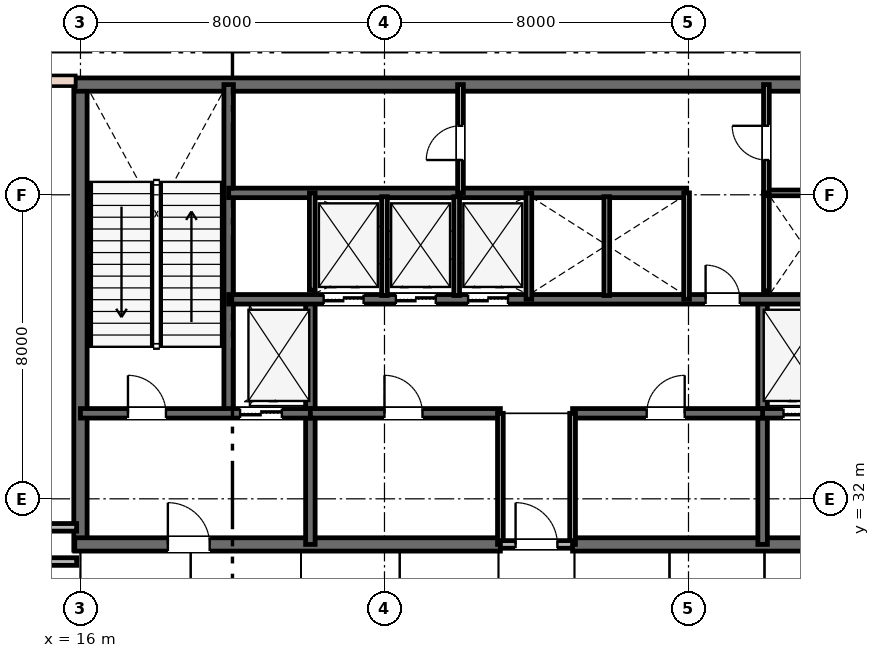
"""IFC4 building model, lengths in metres.
Left out: names, types, materials, properties, quantities, classifications, styles, units other than length and angle.
Written with IfcOpenShell. Run it as: python <this file> out.ifc"""

import sys

from ifc_helpers import new_model, si_unit, direction, frame, frame_2d, origin, place, context, subcontext, project, spatial, rectangle, extrude, element, fill, save


model = new_model("IFC4")
c1 = context("Model", 3, precision=1e-05, world=origin(), true_north=direction((0.0, 1.0)))
c2 = subcontext(c1, "Body", "Model", "MODEL_VIEW")
j1 = project(units=[si_unit("LENGTHUNIT", "METRE"), si_unit("PLANEANGLEUNIT", "RADIAN")], contexts=[c1])
p1 = place(None, origin())
s1 = spatial("IfcSite", under=j1, at=p1, CompositionType="ELEMENT")
p2 = place(p1, origin())
s2 = spatial("IfcBuilding", under=s1, at=p2, CompositionType="ELEMENT")
p3 = place(p2, frame((0.0, 0.0, 208.2)))
s3 = spatial("IfcBuildingStorey", under=s2, at=p3, CompositionType="ELEMENT", Elevation=208.2)
p4 = place(p3, frame((16.0, 30.65, 0.0), z_axis=(0.0, 0.0, 1.0), x_axis=(0.0, 1.0, 0.0)))
e1 = element("IfcWall", 1, at=p4, inside=s3, PredefinedType="SHEAR", context=c2, shape_type="SweptSolid", body=[
    extrude(rectangle(XDim=12.3, YDim=0.35, at=frame_2d((6.15, 0.0))), origin(), (0.0, 0.0, 1.0), 4.8),
])
p5 = place(p3, frame((15.85, 42.9, 0.0), z_axis=(0.0, 0.0, 1.0), x_axis=(1.0, 0.0, 0.0)))
e2 = element("IfcWall", 2, at=p5, inside=s3, PredefinedType="SHEAR", context=c2, shape_type="SweptSolid", body=[
    extrude(rectangle(XDim=24.3, YDim=0.35, at=frame_2d((12.15, 0.0))), origin(), (0.0, 0.0, 1.0), 4.8),
])
p6 = place(p3, frame((15.85, 30.8, 0.0), z_axis=(0.0, 0.0, 1.0), x_axis=(1.0, 0.0, 0.0)))
e3 = element("IfcWall", 3, at=p6, inside=s3, PredefinedType="SHEAR", context=c2, shape_type="SweptSolid", body=[
    extrude(rectangle(XDim=11.2, YDim=0.35, at=frame_2d((5.6, 0.0))), origin(), (0.0, 0.0, 1.0), 4.8),
])
p7 = place(p6, frame((2.45, 0.0, 0.0)))
e4 = element("IfcOpeningElement", 4, at=p7, cuts=e3, PredefinedType="OPENING", context=c2, shape_type="SweptSolid", body=[
    extrude(rectangle(XDim=1.1, YDim=2.15, at=frame_2d((0.55, 1.075))), frame((0.0, 0.185, 0.0), z_axis=(0.0, -1.0, 0.0), x_axis=(1.0, 0.0, 0.0)), (0.0, 0.0, 1.0), 0.37),
])
p8 = place(p3, frame((28.95, 30.8, 0.0), z_axis=(0.0, 0.0, 1.0), x_axis=(1.0, 0.0, 0.0)))
e5 = element("IfcWall", 5, at=p8, inside=s3, PredefinedType="SHEAR", context=c2, shape_type="SweptSolid", body=[
    extrude(rectangle(XDim=11.2, YDim=0.35, at=frame_2d((5.6, 0.0))), origin(), (0.0, 0.0, 1.0), 4.8),
])
p9 = place(p8, frame((7.65, 0.0, 0.0)))
e6 = element("IfcOpeningElement", 6, at=p9, cuts=e5, PredefinedType="OPENING", context=c2, shape_type="SweptSolid", body=[
    extrude(rectangle(XDim=1.1, YDim=2.15, at=frame_2d((0.55, 1.075))), frame((0.0, 0.185, 0.0), z_axis=(0.0, -1.0, 0.0), x_axis=(1.0, 0.0, 0.0)), (0.0, 0.0, 1.0), 0.37),
])
p10 = place(p3, frame((19.9, 34.25, 0.0), z_axis=(0.0, 0.0, 1.0), x_axis=(0.0, 1.0, 0.0)))
e7 = element("IfcWall", 7, at=p10, inside=s3, PredefinedType="SHEAR", context=c2, shape_type="SweptSolid", body=[
    extrude(rectangle(XDim=8.65, YDim=0.25, at=frame_2d((4.325, 0.0))), origin(), (0.0, 0.0, 1.0), 4.8),
])
for number, where, z_axis, x_axis in (
    (8, (22.05, 30.8, 0.0), (0.0, 0.0, 1.0), (0.0, 1.0, 0.0)),
    (9, (33.95, 30.8, 0.0), (0.0, 0.0, 1.0), (0.0, 1.0, 0.0)),
):
    element("IfcWall", number, at=place(p3, frame(where, z_axis=z_axis, x_axis=x_axis)), inside=s3, PredefinedType="SHEAR", context=c2, shape_type="SweptSolid", body=[
        extrude(rectangle(XDim=6.45, YDim=0.25, at=frame_2d((3.225, 0.0))), origin(), (0.0, 0.0, 1.0), 4.8),
    ])
p11 = place(p3, frame((16.0, 34.25, 0.0), z_axis=(0.0, 0.0, 1.0), x_axis=(1.0, 0.0, 0.0)))
e10 = element("IfcWall", 10, at=p11, inside=s3, PredefinedType="SHEAR", context=c2, shape_type="SweptSolid", body=[
    extrude(rectangle(XDim=6.05, YDim=0.25, at=frame_2d((3.025, 0.0))), origin(), (0.0, 0.0, 1.0), 4.8),
])
p12 = place(p11, frame((1.25, 0.0, 0.0)))
e11 = element("IfcOpeningElement", 11, at=p12, cuts=e10, PredefinedType="OPENING", context=c2, shape_type="SweptSolid", body=[
    extrude(rectangle(XDim=1.0, YDim=2.15, at=frame_2d((0.5, 1.075))), frame((0.0, 0.135, 0.0), z_axis=(0.0, -1.0, 0.0), x_axis=(1.0, 0.0, 0.0)), (0.0, 0.0, 1.0), 0.27),
])
p13 = place(p11, frame((4.2, 0.0, 0.0)))
e12 = element("IfcOpeningElement", 12, at=p13, cuts=e10, PredefinedType="OPENING", context=c2, shape_type="SweptSolid", body=[
    extrude(rectangle(XDim=1.1, YDim=2.15, at=frame_2d((0.55, 1.075))), frame((0.0, 0.135, 0.0), z_axis=(0.0, -1.0, 0.0), x_axis=(1.0, 0.0, 0.0)), (0.0, 0.0, 1.0), 0.27),
])
p14 = place(p3, frame((33.95, 34.25, 0.0), z_axis=(0.0, 0.0, 1.0), x_axis=(1.0, 0.0, 0.0)))
e13 = element("IfcWall", 13, at=p14, inside=s3, PredefinedType="SHEAR", context=c2, shape_type="SweptSolid", body=[
    extrude(rectangle(XDim=6.05, YDim=0.25, at=frame_2d((3.025, 0.0))), origin(), (0.0, 0.0, 1.0), 4.8),
])
p15 = place(p14, frame((3.7, 0.0, 0.0)))
e14 = element("IfcOpeningElement", 14, at=p15, cuts=e13, PredefinedType="OPENING", context=c2, shape_type="SweptSolid", body=[
    extrude(rectangle(XDim=1.0, YDim=2.15, at=frame_2d((0.5, 1.075))), frame((0.0, 0.135, 0.0), z_axis=(0.0, -1.0, 0.0), x_axis=(1.0, 0.0, 0.0)), (0.0, 0.0, 1.0), 0.27),
])
p16 = place(p14, frame((0.55, 0.0, 0.0)))
e15 = element("IfcOpeningElement", 15, at=p16, cuts=e13, PredefinedType="OPENING", context=c2, shape_type="SweptSolid", body=[
    extrude(rectangle(XDim=1.1, YDim=2.15, at=frame_2d((0.55, 1.075))), frame((0.0, 0.135, 0.0), z_axis=(0.0, -1.0, 0.0), x_axis=(1.0, 0.0, 0.0)), (0.0, 0.0, 1.0), 0.27),
])
p17 = place(p3, frame((22.05, 34.25, 0.0), z_axis=(0.0, 0.0, 1.0), x_axis=(1.0, 0.0, 0.0)))
e16 = element("IfcWall", 16, at=p17, inside=s3, PredefinedType="SHEAR", context=c2, shape_type="SweptSolid", body=[
    extrude(rectangle(XDim=5.0, YDim=0.25, at=frame_2d((2.5, 0.0))), origin(), (0.0, 0.0, 1.0), 4.8),
])
p18 = place(p17, frame((1.95, 0.0, 0.0)))
e17 = element("IfcOpeningElement", 17, at=p18, cuts=e16, PredefinedType="OPENING", context=c2, shape_type="SweptSolid", body=[
    extrude(rectangle(XDim=1.0, YDim=2.15, at=frame_2d((0.5, 1.075))), frame((0.0, 0.135, 0.0), z_axis=(0.0, -1.0, 0.0), x_axis=(1.0, 0.0, 0.0)), (0.0, 0.0, 1.0), 0.27),
])
p19 = place(p3, frame((28.95, 34.25, 0.0), z_axis=(0.0, 0.0, 1.0), x_axis=(1.0, 0.0, 0.0)))
e18 = element("IfcWall", 18, at=p19, inside=s3, PredefinedType="SHEAR", context=c2, shape_type="SweptSolid", body=[
    extrude(rectangle(XDim=5.0, YDim=0.25, at=frame_2d((2.5, 0.0))), origin(), (0.0, 0.0, 1.0), 4.8),
])
p20 = place(p19, frame((1.95, 0.0, 0.0)))
e19 = element("IfcOpeningElement", 19, at=p20, cuts=e18, PredefinedType="OPENING", context=c2, shape_type="SweptSolid", body=[
    extrude(rectangle(XDim=1.0, YDim=2.15, at=frame_2d((0.5, 1.075))), frame((0.0, 0.135, 0.0), z_axis=(0.0, -1.0, 0.0), x_axis=(1.0, 0.0, 0.0)), (0.0, 0.0, 1.0), 0.27),
])
p21 = place(p3, frame((19.9, 37.25, 0.0), z_axis=(0.0, 0.0, 1.0), x_axis=(1.0, 0.0, 0.0)))
e20 = element("IfcWall", 20, at=p21, inside=s3, PredefinedType="SHEAR", context=c2, shape_type="SweptSolid", body=[
    extrude(rectangle(XDim=16.2, YDim=0.25, at=frame_2d((8.1, 0.0))), origin(), (0.0, 0.0, 1.0), 4.8),
])
p22 = place(p21, frame((12.55, 0.0, 0.0)))
e21 = element("IfcOpeningElement", 21, at=p22, cuts=e20, PredefinedType="OPENING", context=c2, shape_type="SweptSolid", body=[
    extrude(rectangle(XDim=0.9, YDim=2.15, at=frame_2d((0.45, 1.075))), frame((0.0, 0.135, 0.0), z_axis=(0.0, -1.0, 0.0), x_axis=(1.0, 0.0, 0.0)), (0.0, 0.0, 1.0), 0.27),
])
p23 = place(p21, frame((2.5, 0.0, 0.0)))
e22 = element("IfcOpeningElement", 22, at=p23, cuts=e20, PredefinedType="OPENING", context=c2, shape_type="SweptSolid", body=[
    extrude(rectangle(XDim=1.05, YDim=2.15, at=frame_2d((0.525, 1.075))), frame((0.0, 0.135, 0.0), z_axis=(0.0, -1.0, 0.0), x_axis=(1.0, 0.0, 0.0)), (0.0, 0.0, 1.0), 0.27),
])
p24 = place(p21, frame((4.4, 0.0, 0.0)))
e23 = element("IfcOpeningElement", 23, at=p24, cuts=e20, PredefinedType="OPENING", context=c2, shape_type="SweptSolid", body=[
    extrude(rectangle(XDim=1.05, YDim=2.15, at=frame_2d((0.525, 1.075))), frame((0.0, 0.135, 0.0), z_axis=(0.0, -1.0, 0.0), x_axis=(1.0, 0.0, 0.0)), (0.0, 0.0, 1.0), 0.27),
])
p25 = place(p21, frame((6.3, 0.0, 0.0)))
e24 = element("IfcOpeningElement", 24, at=p25, cuts=e20, PredefinedType="OPENING", context=c2, shape_type="SweptSolid", body=[
    extrude(rectangle(XDim=1.05, YDim=2.15, at=frame_2d((0.525, 1.075))), frame((0.0, 0.135, 0.0), z_axis=(0.0, -1.0, 0.0), x_axis=(1.0, 0.0, 0.0)), (0.0, 0.0, 1.0), 0.27),
])
p26 = place(p3, frame((19.9, 40.05, 0.0), z_axis=(0.0, 0.0, 1.0), x_axis=(1.0, 0.0, 0.0)))
e25 = element("IfcWall", 25, at=p26, inside=s3, PredefinedType="SHEAR", context=c2, shape_type="SweptSolid", body=[
    extrude(rectangle(XDim=12.05, YDim=0.25, at=frame_2d((6.025, 0.0))), origin(), (0.0, 0.0, 1.0), 4.8),
])
p27 = place(p3, frame((15.86, 43.0, 0.0), z_axis=(0.0, 0.0, 1.0), x_axis=(-1.0, 0.0, 0.0)))
e26 = element("IfcWall", 26, at=p27, inside=s3, PredefinedType="STANDARD", context=c2, shape_type="SweptSolid", body=[
    extrude(rectangle(XDim=7.36, YDim=0.25, at=frame_2d((3.68, 0.0))), origin(), (0.0, 0.0, 1.0), 1.15),
])
for number, where, z_axis, x_axis in (
    (27, (27.05, 30.8, 0.0), (0.0, 0.0, 1.0), (0.0, 1.0, 0.0)),
    (28, (28.95, 30.8, 0.0), (0.0, 0.0, 1.0), (0.0, 1.0, 0.0)),
):
    element("IfcWall", number, at=place(p3, frame(where, z_axis=z_axis, x_axis=x_axis)), inside=s3, PredefinedType="PLUMBINGWALL", context=c2, shape_type="SweptSolid", body=[
        extrude(rectangle(XDim=3.45, YDim=0.15, at=frame_2d((1.725, 0.0))), origin(), (0.0, 0.0, 1.0), 4.02),
    ])
p28 = place(p3, frame((27.05, 30.8, 0.0), z_axis=(0.0, 0.0, 1.0), x_axis=(1.0, 0.0, 0.0)))
e29 = element("IfcWall", 29, at=p28, inside=s3, PredefinedType="PARTITIONING", context=c2, shape_type="SweptSolid", body=[
    extrude(rectangle(XDim=1.9, YDim=0.2, at=frame_2d((0.95, 0.0))), origin(), (0.0, 0.0, 1.0), 4.02),
])
p29 = place(p28, frame((0.4, 0.0, 0.0)))
e30 = element("IfcOpeningElement", 30, at=p29, cuts=e29, PredefinedType="OPENING", context=c2, shape_type="SweptSolid", body=[
    extrude(rectangle(XDim=1.1, YDim=2.15, at=frame_2d((0.55, 1.075))), frame((0.0, 0.11, 0.0), z_axis=(0.0, -1.0, 0.0), x_axis=(1.0, 0.0, 0.0)), (0.0, 0.0, 1.0), 0.22),
])
p30 = place(p3, frame((22.1, 37.49, 0.0), z_axis=(0.0, 0.0, 1.0), x_axis=(0.0, 1.0, 0.0)))
e31 = element("IfcWall", 31, at=p30, inside=s3, PredefinedType="PLUMBINGWALL", context=c2, shape_type="SweptSolid", body=[
    extrude(rectangle(XDim=2.56, YDim=0.15, at=frame_2d((1.28, 0.0))), origin(), (0.0, 0.0, 1.0), 4.02),
])
p31 = place(p3, frame((27.8, 37.25, 0.0), z_axis=(0.0, 0.0, 1.0), x_axis=(0.0, 1.0, 0.0)))
e32 = element("IfcWall", 32, at=p31, inside=s3, PredefinedType="PLUMBINGWALL", context=c2, shape_type="SweptSolid", body=[
    extrude(rectangle(XDim=2.8, YDim=0.15, at=frame_2d((1.4, 0.0))), origin(), (0.0, 0.0, 1.0), 4.02),
])
for number, where, z_axis, x_axis in (
    (33, (24.0, 37.35, 0.0), (0.0, 0.0, 1.0), (0.0, 1.0, 0.0)),
    (34, (25.9, 37.35, 0.0), (0.0, 0.0, 1.0), (0.0, 1.0, 0.0)),
):
    element("IfcWall", number, at=place(p3, frame(where, z_axis=z_axis, x_axis=x_axis)), inside=s3, PredefinedType="PLUMBINGWALL", context=c2, shape_type="SweptSolid", body=[
        extrude(rectangle(XDim=2.6, YDim=0.15, at=frame_2d((1.3, 0.0))), origin(), (0.0, 0.0, 1.0), 4.02),
    ])
p32 = place(p3, frame((31.95, 37.25, 0.0), z_axis=(0.0, 0.0, 1.0), x_axis=(0.0, 1.0, 0.0)))
e35 = element("IfcWall", 35, at=p32, inside=s3, PredefinedType="PLUMBINGWALL", context=c2, shape_type="SweptSolid", body=[
    extrude(rectangle(XDim=2.8, YDim=0.15, at=frame_2d((1.4, 0.0))), origin(), (0.0, 0.0, 1.0), 4.02),
])
p33 = place(p3, frame((29.85, 37.35, 0.0), z_axis=(0.0, 0.0, 1.0), x_axis=(0.0, 1.0, 0.0)))
e36 = element("IfcWall", 36, at=p33, inside=s3, PredefinedType="PLUMBINGWALL", context=c2, shape_type="SweptSolid", body=[
    extrude(rectangle(XDim=2.6, YDim=0.15, at=frame_2d((1.3, 0.0))), origin(), (0.0, 0.0, 1.0), 4.02),
])
p34 = place(p3, frame((34.05, 37.473, 0.0), z_axis=(0.0, 0.0, 1.0), x_axis=(0.0, 1.0, 0.0)))
e37 = element("IfcWall", 37, at=p34, inside=s3, PredefinedType="PLUMBINGWALL", context=c2, shape_type="SweptSolid", body=[
    extrude(rectangle(XDim=2.577, YDim=0.15, at=frame_2d((1.288, 0.0))), origin(), (0.0, 0.0, 1.0), 4.02),
])
p35 = place(p3, frame((34.05, 40.05, 0.0), z_axis=(0.0, 0.0, 1.0), x_axis=(1.0, 0.0, 0.0)))
e38 = element("IfcWall", 38, at=p35, inside=s3, PredefinedType="PARTITIONING", context=c2, shape_type="SweptSolid", body=[
    extrude(rectangle(XDim=2.05, YDim=0.15, at=frame_2d((1.025, 0.0))), origin(), (0.0, 0.0, 1.0), 4.02),
])
p36 = place(p3, frame((34.05, 40.05, 0.0), z_axis=(0.0, 0.0, 1.0), x_axis=(0.0, 1.0, 0.0)))
e39 = element("IfcWall", 39, at=p36, inside=s3, PredefinedType="PARTITIONING", context=c2, shape_type="SweptSolid", body=[
    extrude(rectangle(XDim=2.85, YDim=0.15, at=frame_2d((1.425, 0.0))), origin(), (0.0, 0.0, 1.0), 4.02),
])
p37 = place(p36, frame((0.865, 0.0, 0.0)))
e40 = element("IfcOpeningElement", 40, at=p37, cuts=e39, PredefinedType="OPENING", context=c2, shape_type="SweptSolid", body=[
    extrude(rectangle(XDim=0.9, YDim=2.15, at=frame_2d((0.45, 1.075))), frame((0.0, 0.085, 0.0), z_axis=(0.0, -1.0, 0.0), x_axis=(1.0, 0.0, 0.0)), (0.0, 0.0, 1.0), 0.17),
])
p38 = place(p3, frame((26.0, 40.05, 0.0), z_axis=(0.0, 0.0, 1.0), x_axis=(0.0, 1.0, 0.0)))
e41 = element("IfcWall", 41, at=p38, inside=s3, PredefinedType="PARTITIONING", context=c2, shape_type="SweptSolid", body=[
    extrude(rectangle(XDim=2.85, YDim=0.15, at=frame_2d((1.425, 0.0))), origin(), (0.0, 0.0, 1.0), 4.02),
])
p39 = place(p38, frame((0.865, 0.0, 0.0)))
e42 = element("IfcOpeningElement", 42, at=p39, cuts=e41, PredefinedType="OPENING", context=c2, shape_type="SweptSolid", body=[
    extrude(rectangle(XDim=0.9, YDim=2.15, at=frame_2d((0.45, 1.075))), frame((0.0, 0.085, 0.0), z_axis=(0.0, -1.0, 0.0), x_axis=(1.0, 0.0, 0.0)), (0.0, 0.0, 1.0), 0.17),
])
for number, where, z_axis, x_axis in (
    (43, (5.1, 30.35, 0.0), (0.0, 0.0, 1.0), (1.0, 0.0, 0.0)),
    (44, (5.1, 31.25, 0.0), (0.0, 0.0, 1.0), (1.0, 0.0, 0.0)),
):
    element("IfcWall", number, at=place(p3, frame(where, z_axis=z_axis, x_axis=x_axis)), inside=s3, PredefinedType="PARTITIONING", context=c2, shape_type="SweptSolid", body=[
        extrude(rectangle(XDim=10.8, YDim=0.2, at=frame_2d((5.4, 0.0))), origin(), (0.0, 0.0, 1.0), 3.83),
    ])
p40 = place(p29, origin())
e45 = element("IfcDoor", 45, at=p40, inside=s3, OperationType="SINGLE_SWING_LEFT", PredefinedType="DOOR", context=c2, shape_type="SweptSolid", body=[
    extrude(rectangle(XDim=1.1, YDim=2.15, at=frame_2d((0.55, 1.075))), frame((0.0, 0.025, 0.0), z_axis=(0.0, -1.0, 0.0), x_axis=(1.0, 0.0, 0.0)), (0.0, 0.0, 1.0), 0.05),
])
fill(e30, e45)
p41 = place(p12, origin())
e46 = element("IfcDoor", 46, at=p41, inside=s3, OperationType="SINGLE_SWING_LEFT", PredefinedType="DOOR", context=c2, shape_type="SweptSolid", body=[
    extrude(rectangle(XDim=1.0, YDim=2.15, at=frame_2d((0.5, 1.075))), frame((0.0, 0.025, 0.0), z_axis=(0.0, -1.0, 0.0), x_axis=(1.0, 0.0, 0.0)), (0.0, 0.0, 1.0), 0.05),
])
fill(e11, e46)
p42 = place(p7, origin())
e47 = element("IfcDoor", 47, at=p42, inside=s3, OperationType="SINGLE_SWING_LEFT", PredefinedType="DOOR", context=c2, shape_type="SweptSolid", body=[
    extrude(rectangle(XDim=1.1, YDim=2.15, at=frame_2d((0.55, 1.075))), frame((0.0, 0.025, 0.0), z_axis=(0.0, -1.0, 0.0), x_axis=(1.0, 0.0, 0.0)), (0.0, 0.0, 1.0), 0.05),
])
fill(e4, e47)
p43 = place(p18, origin())
e48 = element("IfcDoor", 48, at=p43, inside=s3, OperationType="SINGLE_SWING_LEFT", PredefinedType="DOOR", context=c2, shape_type="SweptSolid", body=[
    extrude(rectangle(XDim=1.0, YDim=2.15, at=frame_2d((0.5, 1.075))), frame((0.0, 0.025, 0.0), z_axis=(0.0, -1.0, 0.0), x_axis=(1.0, 0.0, 0.0)), (0.0, 0.0, 1.0), 0.05),
])
fill(e17, e48)
p44 = place(p20, origin())
e49 = element("IfcDoor", 49, at=p44, inside=s3, OperationType="SINGLE_SWING_RIGHT", PredefinedType="DOOR", context=c2, shape_type="SweptSolid", body=[
    extrude(rectangle(XDim=1.0, YDim=2.15, at=frame_2d((0.5, 1.075))), frame((0.0, 0.025, 0.0), z_axis=(0.0, -1.0, 0.0), x_axis=(1.0, 0.0, 0.0)), (0.0, 0.0, 1.0), 0.05),
])
fill(e19, e49)
p45 = place(p22, origin())
e50 = element("IfcDoor", 50, at=p45, inside=s3, OperationType="SINGLE_SWING_LEFT", PredefinedType="DOOR", context=c2, shape_type="SweptSolid", body=[
    extrude(rectangle(XDim=0.9, YDim=2.15, at=frame_2d((0.45, 1.075))), frame((0.0, 0.025, 0.0), z_axis=(0.0, -1.0, 0.0), x_axis=(1.0, 0.0, 0.0)), (0.0, 0.0, 1.0), 0.05),
])
fill(e21, e50)
p46 = place(p37, origin())
e51 = element("IfcDoor", 51, at=p46, inside=s3, OperationType="SINGLE_SWING_RIGHT", PredefinedType="DOOR", context=c2, shape_type="SweptSolid", body=[
    extrude(rectangle(XDim=0.9, YDim=2.15, at=frame_2d((0.45, 1.075))), frame((0.0, 0.025, 0.0), z_axis=(0.0, -1.0, 0.0), x_axis=(1.0, 0.0, 0.0)), (0.0, 0.0, 1.0), 0.05),
])
fill(e40, e51)
p47 = place(p39, origin())
e52 = element("IfcDoor", 52, at=p47, inside=s3, OperationType="SINGLE_SWING_LEFT", PredefinedType="DOOR", context=c2, shape_type="SweptSolid", body=[
    extrude(rectangle(XDim=0.9, YDim=2.15, at=frame_2d((0.45, 1.075))), frame((0.0, 0.025, 0.0), z_axis=(0.0, -1.0, 0.0), x_axis=(1.0, 0.0, 0.0)), (0.0, 0.0, 1.0), 0.05),
])
fill(e42, e52)
p48 = place(p13, origin())
e53 = element("IfcDoor", 53, at=p48, inside=s3, OperationType="DOUBLE_DOOR_SLIDING", PredefinedType="DOOR", context=c2, shape_type="SweptSolid", body=[
    extrude(rectangle(XDim=1.1, YDim=2.15, at=frame_2d((0.55, 1.075))), frame((0.0, 0.025, 0.0), z_axis=(0.0, -1.0, 0.0), x_axis=(1.0, 0.0, 0.0)), (0.0, 0.0, 1.0), 0.05),
])
fill(e12, e53)
p49 = place(p16, origin())
e54 = element("IfcDoor", 54, at=p49, inside=s3, OperationType="DOUBLE_DOOR_SLIDING", PredefinedType="DOOR", context=c2, shape_type="SweptSolid", body=[
    extrude(rectangle(XDim=1.1, YDim=2.15, at=frame_2d((0.55, 1.075))), frame((0.0, 0.025, 0.0), z_axis=(0.0, -1.0, 0.0), x_axis=(1.0, 0.0, 0.0)), (0.0, 0.0, 1.0), 0.05),
])
fill(e15, e54)
p50 = place(p23, origin())
e55 = element("IfcDoor", 55, at=p50, inside=s3, OperationType="DOUBLE_DOOR_SLIDING", PredefinedType="DOOR", context=c2, shape_type="SweptSolid", body=[
    extrude(rectangle(XDim=1.05, YDim=2.15, at=frame_2d((0.525, 1.075))), frame((0.0, 0.025, 0.0), z_axis=(0.0, -1.0, 0.0), x_axis=(1.0, 0.0, 0.0)), (0.0, 0.0, 1.0), 0.05),
])
fill(e22, e55)
p51 = place(p24, origin())
e56 = element("IfcDoor", 56, at=p51, inside=s3, OperationType="DOUBLE_DOOR_SLIDING", PredefinedType="DOOR", context=c2, shape_type="SweptSolid", body=[
    extrude(rectangle(XDim=1.05, YDim=2.15, at=frame_2d((0.525, 1.075))), frame((0.0, 0.025, 0.0), z_axis=(0.0, -1.0, 0.0), x_axis=(1.0, 0.0, 0.0)), (0.0, 0.0, 1.0), 0.05),
])
fill(e23, e56)
p52 = place(p25, origin())
e57 = element("IfcDoor", 57, at=p52, inside=s3, OperationType="DOUBLE_DOOR_SLIDING", PredefinedType="DOOR", context=c2, shape_type="SweptSolid", body=[
    extrude(rectangle(XDim=1.05, YDim=2.15, at=frame_2d((0.525, 1.075))), frame((0.0, 0.025, 0.0), z_axis=(0.0, -1.0, 0.0), x_axis=(1.0, 0.0, 0.0)), (0.0, 0.0, 1.0), 0.05),
])
fill(e24, e57)
save(model, sys.argv[1])
